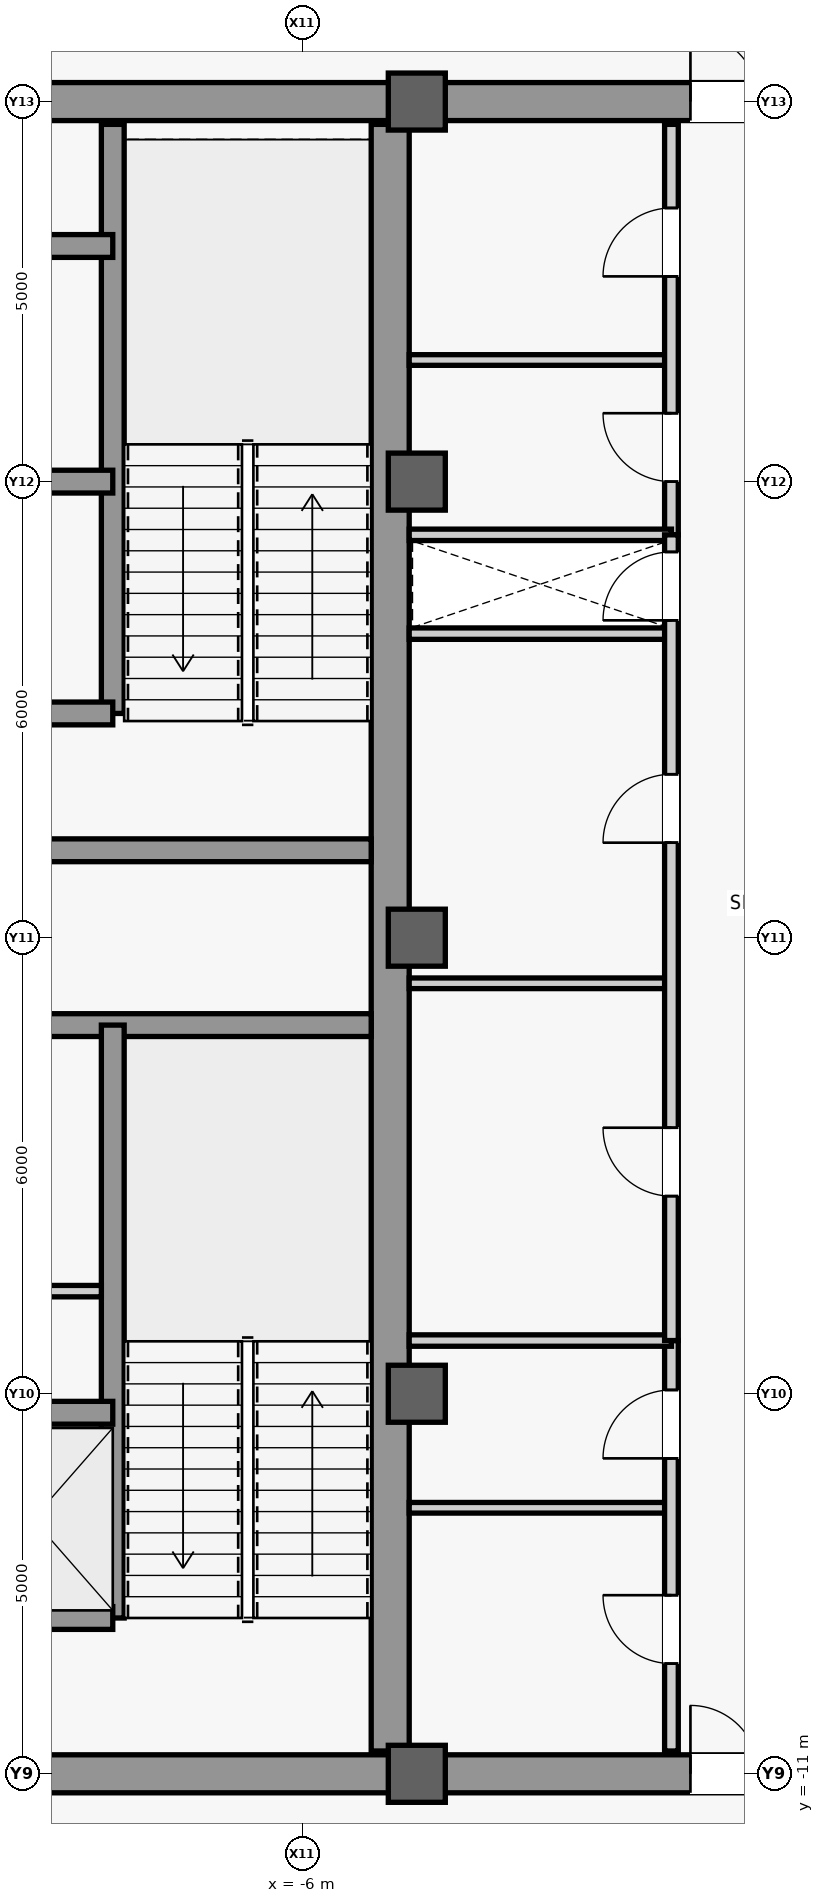
"""IFC4 building model, lengths in metres.
Left out: names, types, materials, properties, quantities, classifications, styles, units other than length and angle.
Written with IfcOpenShell. Run it as: python <this file> out.ifc"""

import sys

from ifc_helpers import new_model, si_unit, direction, frame, frame_2d, origin, origin_2d, place, context, subcontext, project, spatial, rectangle, extrude, source, transform, mapped, element, fill, save


model = new_model("IFC4")
c1 = context("Model", 3, precision=1e-05, world=origin(), true_north=direction((0.0, 1.0)))
c2 = subcontext(c1, "Body", "Model", "MODEL_VIEW")
j1 = project(units=[si_unit("LENGTHUNIT", "METRE"), si_unit("PLANEANGLEUNIT", "RADIAN")], contexts=[c1])
p1 = place(None, origin())
s1 = spatial("IfcSite", under=j1, at=p1, CompositionType="ELEMENT")
p2 = place(p1, origin())
s2 = spatial("IfcBuilding", under=s1, at=p2, CompositionType="ELEMENT")
p3 = place(p2, frame((0.0, 0.0, 389.9)))
s3 = spatial("IfcBuildingStorey", under=s2, at=p3, CompositionType="ELEMENT", Elevation=389.9)
m1 = source(origin(), c2, "Body", "SweptSolid", [
    extrude(rectangle(XDim=21.4, YDim=0.5, at=frame_2d((10.7, 0.0))), origin(), (0.0, 0.0, 1.0), 4.45),
])
p4 = place(p3, frame((-4.85, -10.7, 0.0), z_axis=(0.0, 0.0, 1.0), x_axis=(0.0, 1.0, 0.0)))
e1 = element("IfcWall", 1, at=p4, inside=s3, PredefinedType="SHEAR", context=c2, shape_type="MappedRepresentation", body=[
    mapped(m1, transform((0.0, 0.0, 0.0), scale=1.0)),
])
m2 = source(origin(), c2, "Body", "SweptSolid", [
    extrude(rectangle(XDim=5.9, YDim=0.5, at=frame_2d((2.95, 0.0))), origin(), (0.0, 0.0, 1.0), 4.45),
])
for number, where, z_axis, x_axis in (
    (2, (-10.75, -11.0, 0.0), (0.0, 0.0, 1.0), (1.0, 0.0, 0.0)),
    (3, (-10.75, 11.0, 0.0), (0.0, 0.0, 1.0), (1.0, 0.0, 0.0)),
):
    element("IfcWall", number, at=place(p3, frame(where, z_axis=z_axis, x_axis=x_axis)), inside=s3, PredefinedType="SHEAR", context=c2, shape_type="MappedRepresentation", body=[
        mapped(m2, transform((0.0, 0.0, 0.0), scale=1.0)),
    ])
m3 = source(origin(), c2, "Body", "SweptSolid", [
    extrude(rectangle(XDim=5.65, YDim=0.3, at=frame_2d((2.825, 0.0))), origin(), (0.0, 0.0, 1.0), 4.45),
])
for number, where, z_axis, x_axis in (
    (4, (-10.75, -1.15, 0.0), (0.0, 0.0, 1.0), (1.0, 0.0, 0.0)),
    (5, (-10.75, 1.15, 0.0), (0.0, 0.0, 1.0), (1.0, 0.0, 0.0)),
):
    element("IfcWall", number, at=place(p3, frame(where, z_axis=z_axis, x_axis=x_axis)), inside=s3, PredefinedType="SHEAR", context=c2, shape_type="MappedRepresentation", body=[
        mapped(m3, transform((0.0, 0.0, 0.0), scale=1.0)),
    ])
m4 = source(origin(), c2, "Body", "SweptSolid", [
    extrude(rectangle(XDim=9.2, YDim=0.5, at=frame_2d((4.6, 0.0))), origin(), (0.0, 0.0, 1.0), 4.45),
])
p5 = place(p3, frame((-4.6, -11.0, 0.0), z_axis=(0.0, 0.0, 1.0), x_axis=(1.0, 0.0, 0.0)))
e6 = element("IfcWall", 6, at=p5, inside=s3, PredefinedType="SHEAR", context=c2, shape_type="MappedRepresentation", body=[
    mapped(m4, transform((0.0, 0.0, 0.0), scale=1.0)),
])
m5 = source(origin(), c2, "Body", "SweptSolid", [
    extrude(rectangle(XDim=1.8, YDim=2.25, at=frame_2d((0.9, 1.125))), frame((0.0, 0.26, 0.0), z_axis=(0.0, -1.0, 0.0), x_axis=(1.0, 0.0, 0.0)), (0.0, 0.0, 1.0), 0.52),
])
p6 = place(p5, frame((3.7, 0.0, 0.0)))
e7 = element("IfcOpeningElement", 7, at=p6, cuts=e6, PredefinedType="OPENING", context=c2, shape_type="MappedRepresentation", body=[
    mapped(m5, transform((0.0, 0.0, 0.0), scale=1.0)),
])
p7 = place(p3, frame((-4.6, 11.0, 0.0), z_axis=(0.0, 0.0, 1.0), x_axis=(1.0, 0.0, 0.0)))
e8 = element("IfcWall", 8, at=p7, inside=s3, PredefinedType="SHEAR", context=c2, shape_type="MappedRepresentation", body=[
    mapped(m4, transform((0.0, 0.0, 0.0), scale=1.0)),
])
p8 = place(p7, frame((3.7, 0.0, 0.0)))
e9 = element("IfcOpeningElement", 9, at=p8, cuts=e8, PredefinedType="OPENING", context=c2, shape_type="MappedRepresentation", body=[
    mapped(m5, transform((0.0, 0.0, 0.0), scale=1.0)),
])
m6 = source(origin(), c2, "Body", "SweptSolid", [
    extrude(rectangle(XDim=0.75, YDim=0.75, at=origin_2d()), origin(), (0.0, 0.0, 1.0), 4.8),
])
for number, where, z_axis, x_axis in (
    (10, (-4.5, -11.0, 0.0), (0.0, 0.0, 1.0), (1.0, 0.0, 0.0)),
    (11, (-4.5, -6.0, 0.0), (0.0, 0.0, 1.0), (1.0, 0.0, 0.0)),
    (12, (-4.5, 0.0, 0.0), (0.0, 0.0, 1.0), (1.0, 0.0, 0.0)),
    (13, (-4.5, 6.0, 0.0), (0.0, 0.0, 1.0), (1.0, 0.0, 0.0)),
    (14, (-4.5, 11.0, 0.0), (0.0, 0.0, 1.0), (1.0, 0.0, 0.0)),
):
    element("IfcColumn", number, at=place(p3, frame(where, z_axis=z_axis, x_axis=x_axis)), inside=s3, PredefinedType="COLUMN", context=c2, shape_type="MappedRepresentation", body=[
        mapped(m6, transform((0.0, 0.0, 0.0), scale=1.0)),
    ])
m7 = source(origin(), c2, "Body", "SweptSolid", [
    extrude(rectangle(XDim=7.8, YDim=0.3, at=frame_2d((3.9, 0.0))), origin(), (0.0, 0.0, 1.0), 4.45),
])
p9 = place(p3, frame((-8.5, -8.95, 0.0), z_axis=(0.0, 0.0, 1.0), x_axis=(0.0, 1.0, 0.0)))
e15 = element("IfcWall", 15, at=p9, inside=s3, PredefinedType="SHEAR", context=c2, shape_type="MappedRepresentation", body=[
    mapped(m7, transform((0.0, 0.0, 0.0), scale=1.0)),
])
m8 = source(origin(), c2, "Body", "SweptSolid", [
    extrude(rectangle(XDim=2.2, YDim=0.3, at=frame_2d((1.1, 0.0))), origin(), (0.0, 0.0, 1.0), 4.45),
])
for number, where, z_axis, x_axis in (
    (16, (-10.7, -8.95, 0.0), (0.0, 0.0, 1.0), (1.0, 0.0, 0.0)),
    (17, (-10.7, -6.25, 0.0), (0.0, 0.0, 1.0), (1.0, 0.0, 0.0)),
):
    element("IfcWall", number, at=place(p3, frame(where, z_axis=z_axis, x_axis=x_axis)), inside=s3, PredefinedType="SHEAR", context=c2, shape_type="MappedRepresentation", body=[
        mapped(m8, transform((0.0, 0.0, 0.0), scale=1.0)),
    ])
m9 = source(origin(), c2, "Body", "SweptSolid", [
    extrude(rectangle(XDim=7.75, YDim=0.3, at=frame_2d((3.875, 0.0))), origin(), (0.0, 0.0, 1.0), 4.45),
])
p10 = place(p3, frame((-8.5, 2.95, 0.0), z_axis=(0.0, 0.0, 1.0), x_axis=(0.0, 1.0, 0.0)))
e18 = element("IfcWall", 18, at=p10, inside=s3, PredefinedType="SHEAR", context=c2, shape_type="MappedRepresentation", body=[
    mapped(m9, transform((0.0, 0.0, 0.0), scale=1.0)),
])
for number, where, z_axis, x_axis in (
    (19, (-10.7, 2.95, 0.0), (0.0, 0.0, 1.0), (1.0, 0.0, 0.0)),
    (20, (-10.7, 6.0, 0.0), (0.0, 0.0, 1.0), (1.0, 0.0, 0.0)),
    (21, (-10.7, 9.1, 0.0), (0.0, 0.0, 1.0), (1.0, 0.0, 0.0)),
):
    element("IfcWall", number, at=place(p3, frame(where, z_axis=z_axis, x_axis=x_axis)), inside=s3, PredefinedType="SHEAR", context=c2, shape_type="MappedRepresentation", body=[
        mapped(m8, transform((0.0, 0.0, 0.0), scale=1.0)),
    ])
m10 = source(origin(), c2, "Body", "SweptSolid", [
    extrude(rectangle(XDim=2.05, YDim=0.15, at=frame_2d((1.025, 0.0))), origin(), (0.0, 0.0, 1.0), 4.45),
])
p11 = place(p3, frame((-10.7, -4.65, 0.0), z_axis=(0.0, 0.0, 1.0), x_axis=(1.0, 0.0, 0.0)))
e22 = element("IfcWall", 22, at=p11, inside=s3, PredefinedType="PARTITIONING", context=c2, shape_type="MappedRepresentation", body=[
    mapped(m10, transform((0.0, 0.0, 0.0), scale=1.0)),
])
m11 = source(origin(), c2, "Body", "SweptSolid", [
    extrude(rectangle(XDim=3.45, YDim=0.15, at=frame_2d((1.725, 0.0))), origin(), (0.0, 0.0, 1.0), 4.45),
])
p12 = place(p3, frame((-4.6, 4.0, 0.0), z_axis=(0.0, 0.0, 1.0), x_axis=(1.0, 0.0, 0.0)))
e23 = element("IfcWall", 23, at=p12, inside=s3, PredefinedType="PARTITIONING", context=c2, shape_type="MappedRepresentation", body=[
    mapped(m11, transform((0.0, 0.0, 0.0), scale=1.0)),
])
m12 = source(origin(), c2, "Body", "SweptSolid", [
    extrude(rectangle(XDim=3.45, YDim=0.14, at=frame_2d((1.725, 0.0))), origin(), (0.0, 0.0, 1.0), 4.45),
])
p13 = place(p3, frame((-4.6, -7.5, 0.0), z_axis=(0.0, 0.0, 1.0), x_axis=(1.0, 0.0, 0.0)))
e24 = element("IfcWall", 24, at=p13, inside=s3, PredefinedType="PARTITIONING", context=c2, shape_type="MappedRepresentation", body=[
    mapped(m12, transform((0.0, 0.0, 0.0), scale=1.0)),
])
m13 = source(origin(), c2, "Body", "SweptSolid", [
    extrude(rectangle(XDim=5.4, YDim=0.18, at=frame_2d((2.7, 0.0))), origin(), (0.0, 0.0, 1.0), 4.45),
])
p14 = place(p3, frame((-1.15, -10.7, 0.0), z_axis=(0.0, 0.0, 1.0), x_axis=(0.0, 1.0, 0.0)))
e25 = element("IfcWall", 25, at=p14, inside=s3, PredefinedType="PARTITIONING", context=c2, shape_type="MappedRepresentation", body=[
    mapped(m13, transform((0.0, 0.0, 0.0), scale=1.0)),
])
m14 = source(origin(), c2, "Body", "SweptSolid", [
    extrude(rectangle(XDim=0.9, YDim=2.15, at=frame_2d((0.45, 1.075))), frame((0.0, 0.1, 0.0), z_axis=(0.0, -1.0, 0.0), x_axis=(1.0, 0.0, 0.0)), (0.0, 0.0, 1.0), 0.2),
])
p15 = place(p14, frame((1.15, 0.0, 0.0)))
e26 = element("IfcOpeningElement", 26, at=p15, cuts=e25, PredefinedType="OPENING", context=c2, shape_type="MappedRepresentation", body=[
    mapped(m14, transform((0.0, 0.0, 0.0), scale=1.0)),
])
p16 = place(p14, frame((3.85, 0.0, 0.0)))
e27 = element("IfcOpeningElement", 27, at=p16, cuts=e25, PredefinedType="OPENING", context=c2, shape_type="MappedRepresentation", body=[
    mapped(m14, transform((0.0, 0.0, 0.0), scale=1.0)),
])
p17 = place(p3, frame((-4.6, -5.3, 0.0), z_axis=(0.0, 0.0, 1.0), x_axis=(1.0, 0.0, 0.0)))
e28 = element("IfcWall", 28, at=p17, inside=s3, PredefinedType="PARTITIONING", context=c2, shape_type="MappedRepresentation", body=[
    mapped(m11, transform((0.0, 0.0, 0.0), scale=1.0)),
])
p18 = place(p3, frame((-4.6, 7.6, 0.0), z_axis=(0.0, 0.0, 1.0), x_axis=(1.0, 0.0, 0.0)))
e29 = element("IfcWall", 29, at=p18, inside=s3, PredefinedType="PARTITIONING", context=c2, shape_type="MappedRepresentation", body=[
    mapped(m12, transform((0.0, 0.0, 0.0), scale=1.0)),
])
p19 = place(p3, frame((-1.15, 5.3, 0.0), z_axis=(0.0, 0.0, 1.0), x_axis=(0.0, 1.0, 0.0)))
e30 = element("IfcWall", 30, at=p19, inside=s3, PredefinedType="PARTITIONING", context=c2, shape_type="MappedRepresentation", body=[
    mapped(m13, transform((0.0, 0.0, 0.0), scale=1.0)),
])
p20 = place(p19, frame((0.7, 0.0, 0.0)))
e31 = element("IfcOpeningElement", 31, at=p20, cuts=e30, PredefinedType="OPENING", context=c2, shape_type="MappedRepresentation", body=[
    mapped(m14, transform((0.0, 0.0, 0.0), scale=1.0)),
])
p21 = place(p19, frame((3.4, 0.0, 0.0)))
e32 = element("IfcOpeningElement", 32, at=p21, cuts=e30, PredefinedType="OPENING", context=c2, shape_type="MappedRepresentation", body=[
    mapped(m14, transform((0.0, 0.0, 0.0), scale=1.0)),
])
p22 = place(p3, frame((-4.6, 5.3, 0.0), z_axis=(0.0, 0.0, 1.0), x_axis=(1.0, 0.0, 0.0)))
e33 = element("IfcWall", 33, at=p22, inside=s3, PredefinedType="PARTITIONING", context=c2, shape_type="MappedRepresentation", body=[
    mapped(m11, transform((0.0, 0.0, 0.0), scale=1.0)),
])
p23 = place(p3, frame((-4.6, -0.6, 0.0), z_axis=(0.0, 0.0, 1.0), x_axis=(1.0, 0.0, 0.0)))
e34 = element("IfcWall", 34, at=p23, inside=s3, PredefinedType="PARTITIONING", context=c2, shape_type="MappedRepresentation", body=[
    mapped(m12, transform((0.0, 0.0, 0.0), scale=1.0)),
])
m15 = source(origin(), c2, "Body", "SweptSolid", [
    extrude(rectangle(XDim=10.6, YDim=0.18, at=frame_2d((5.3, 0.0))), origin(), (0.0, 0.0, 1.0), 4.45),
])
p24 = place(p3, frame((-1.15, -5.3, 0.0), z_axis=(0.0, 0.0, 1.0), x_axis=(0.0, 1.0, 0.0)))
e35 = element("IfcWall", 35, at=p24, inside=s3, PredefinedType="PARTITIONING", context=c2, shape_type="MappedRepresentation", body=[
    mapped(m15, transform((0.0, 0.0, 0.0), scale=1.0)),
])
p25 = place(p24, frame((1.9, 0.0, 0.0)))
e36 = element("IfcOpeningElement", 36, at=p25, cuts=e35, PredefinedType="OPENING", context=c2, shape_type="MappedRepresentation", body=[
    mapped(m14, transform((0.0, 0.0, 0.0), scale=1.0)),
])
p26 = place(p24, frame((6.55, 0.0, 0.0)))
e37 = element("IfcOpeningElement", 37, at=p26, cuts=e35, PredefinedType="OPENING", context=c2, shape_type="MappedRepresentation", body=[
    mapped(m14, transform((0.0, 0.0, 0.0), scale=1.0)),
])
p27 = place(p24, frame((9.475, 0.0, 0.0)))
e38 = element("IfcOpeningElement", 38, at=p27, cuts=e35, PredefinedType="OPENING", context=c2, shape_type="MappedRepresentation", body=[
    mapped(m14, transform((0.0, 0.0, 0.0), scale=1.0)),
])
m16 = source(origin(), c2, "Body", "SweptSolid", [
    extrude(rectangle(XDim=0.9, YDim=2.15, at=frame_2d((0.45, 1.075))), frame((0.0, 0.025, 0.0), z_axis=(0.0, -1.0, 0.0), x_axis=(1.0, 0.0, 0.0)), (0.0, 0.0, 1.0), 0.05),
])
p28 = place(p15, origin())
e39 = element("IfcDoor", 39, at=p28, inside=s3, OperationType="SINGLE_SWING_RIGHT", PredefinedType="DOOR", context=c2, shape_type="MappedRepresentation", body=[
    mapped(m16, transform((0.0, 0.0, 0.0), scale=1.0)),
])
fill(e26, e39)
p29 = place(p16, origin())
e40 = element("IfcDoor", 40, at=p29, inside=s3, OperationType="SINGLE_SWING_LEFT", PredefinedType="DOOR", context=c2, shape_type="MappedRepresentation", body=[
    mapped(m16, transform((0.0, 0.0, 0.0), scale=1.0)),
])
fill(e27, e40)
m17 = source(origin(), c2, "Body", "SweptSolid", [
    extrude(rectangle(XDim=1.8, YDim=2.25, at=frame_2d((0.9, 1.125))), frame((0.0, 0.025, 0.0), z_axis=(0.0, -1.0, 0.0), x_axis=(1.0, 0.0, 0.0)), (0.0, 0.0, 1.0), 0.05),
])
p30 = place(p6, origin())
e41 = element("IfcDoor", 41, at=p30, inside=s3, OperationType="SINGLE_SWING_LEFT", PredefinedType="DOOR", context=c2, shape_type="MappedRepresentation", body=[
    mapped(m17, transform((0.0, 0.0, 0.0), scale=1.0)),
])
fill(e7, e41)
p31 = place(p20, origin())
e42 = element("IfcDoor", 42, at=p31, inside=s3, OperationType="SINGLE_SWING_RIGHT", PredefinedType="DOOR", context=c2, shape_type="MappedRepresentation", body=[
    mapped(m16, transform((0.0, 0.0, 0.0), scale=1.0)),
])
fill(e31, e42)
p32 = place(p21, origin())
e43 = element("IfcDoor", 43, at=p32, inside=s3, OperationType="SINGLE_SWING_LEFT", PredefinedType="DOOR", context=c2, shape_type="MappedRepresentation", body=[
    mapped(m16, transform((0.0, 0.0, 0.0), scale=1.0)),
])
fill(e32, e43)
p33 = place(p8, origin())
e44 = element("IfcDoor", 44, at=p33, inside=s3, OperationType="SINGLE_SWING_RIGHT", PredefinedType="DOOR", context=c2, shape_type="MappedRepresentation", body=[
    mapped(m17, transform((0.0, 0.0, 0.0), scale=1.0)),
])
fill(e9, e44)
p34 = place(p25, origin())
e45 = element("IfcDoor", 45, at=p34, inside=s3, OperationType="SINGLE_SWING_RIGHT", PredefinedType="DOOR", context=c2, shape_type="MappedRepresentation", body=[
    mapped(m16, transform((0.0, 0.0, 0.0), scale=1.0)),
])
fill(e36, e45)
p35 = place(p26, origin())
e46 = element("IfcDoor", 46, at=p35, inside=s3, OperationType="SINGLE_SWING_LEFT", PredefinedType="DOOR", context=c2, shape_type="MappedRepresentation", body=[
    mapped(m16, transform((0.0, 0.0, 0.0), scale=1.0)),
])
fill(e37, e46)
p36 = place(p27, origin())
e47 = element("IfcDoor", 47, at=p36, inside=s3, OperationType="SINGLE_SWING_LEFT", PredefinedType="DOOR", context=c2, shape_type="MappedRepresentation", body=[
    mapped(m16, transform((0.0, 0.0, 0.0), scale=1.0)),
])
fill(e38, e47)
save(model, sys.argv[1])
